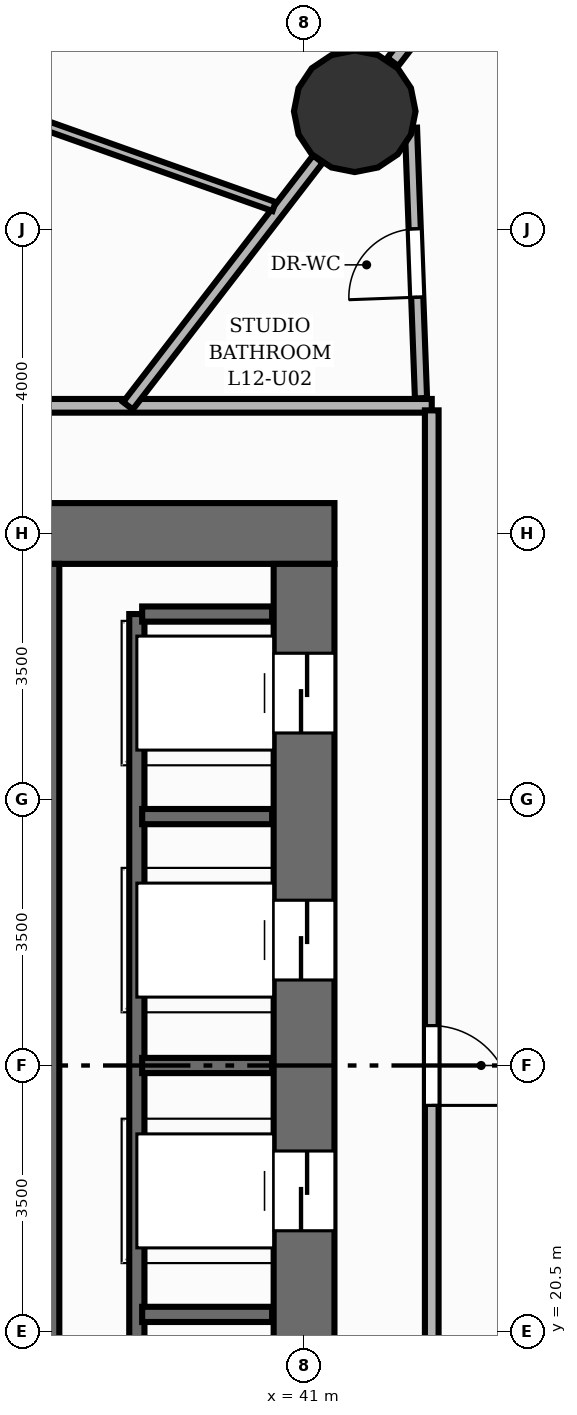
"""IFC4 building model, lengths in metres.
Left out: names, types, materials, properties, quantities, classifications, styles, units other than length and angle.
Written with IfcOpenShell. Run it as: python <this file> out.ifc"""

import sys

from ifc_helpers import new_model, si_unit, direction, frame, frame_2d, origin, origin_2d, place, context, subcontext, project, spatial, rectangle, circle, extrude, element, fill, save


model = new_model("IFC4")
c1 = context("Model", 3, precision=1e-05, world=origin(), true_north=direction((0.0, 1.0)))
c2 = subcontext(c1, "Body", "Model", "MODEL_VIEW")
j1 = project(units=[si_unit("LENGTHUNIT", "METRE"), si_unit("PLANEANGLEUNIT", "RADIAN")], contexts=[c1])
p1 = place(None, origin())
s1 = spatial("IfcSite", under=j1, at=p1, CompositionType="ELEMENT")
p2 = place(p1, origin())
s2 = spatial("IfcBuilding", under=s1, at=p2, CompositionType="ELEMENT")
p3 = place(p2, frame((0.0, 0.0, 44.0)))
s3 = spatial("IfcBuildingStorey", under=s2, at=p3, CompositionType="ELEMENT", Elevation=44.0)
p4 = place(p3, frame((22.6, 31.0, 0.0), z_axis=(0.0, 0.0, 1.0), x_axis=(1.0, 0.0, 0.0)))
e1 = element("IfcWall", 1, at=p4, inside=s3, PredefinedType="SHEAR", context=c2, shape_type="SweptSolid", body=[
    extrude(rectangle(XDim=18.8, YDim=0.8, at=frame_2d((9.4, 0.0))), origin(), (0.0, 0.0, 1.0), 3.2),
])
p5 = place(p4, frame((11.8, 0.0, 0.0)))
e2 = element("IfcOpeningElement", 2, at=p5, cuts=e1, PredefinedType="OPENING", context=c2, shape_type="SweptSolid", body=[
    extrude(rectangle(XDim=1.1, YDim=2.15, at=frame_2d((0.55, 1.075))), frame((0.0, 0.41, 0.0), z_axis=(0.0, -1.0, 0.0), x_axis=(1.0, 0.0, 0.0)), (0.0, 0.0, 1.0), 0.82),
])
p6 = place(p3, frame((41.0, 17.4, 0.0), z_axis=(0.0, 0.0, 1.0), x_axis=(0.0, 1.0, 0.0)))
e3 = element("IfcWall", 3, at=p6, inside=s3, PredefinedType="SHEAR", context=c2, shape_type="SweptSolid", body=[
    extrude(rectangle(XDim=13.2, YDim=0.8, at=frame_2d((6.6, 0.0))), origin(), (0.0, 0.0, 1.0), 3.2),
])
p7 = place(p6, frame((1.175, 0.0, 0.0)))
e4 = element("IfcOpeningElement", 4, at=p7, cuts=e3, PredefinedType="OPENING", context=c2, shape_type="SweptSolid", body=[
    extrude(rectangle(XDim=1.05, YDim=2.15, at=frame_2d((0.525, 1.075))), frame((0.0, 0.41, 0.0), z_axis=(0.0, -1.0, 0.0), x_axis=(1.0, 0.0, 0.0)), (0.0, 0.0, 1.0), 0.82),
])
p8 = place(p6, frame((4.425, 0.0, 0.0)))
e5 = element("IfcOpeningElement", 5, at=p8, cuts=e3, PredefinedType="OPENING", context=c2, shape_type="SweptSolid", body=[
    extrude(rectangle(XDim=1.05, YDim=2.15, at=frame_2d((0.525, 1.075))), frame((0.0, 0.41, 0.0), z_axis=(0.0, -1.0, 0.0), x_axis=(1.0, 0.0, 0.0)), (0.0, 0.0, 1.0), 0.82),
])
p9 = place(p6, frame((7.725, 0.0, 0.0)))
e6 = element("IfcOpeningElement", 6, at=p9, cuts=e3, PredefinedType="OPENING", context=c2, shape_type="SweptSolid", body=[
    extrude(rectangle(XDim=1.05, YDim=2.15, at=frame_2d((0.525, 1.075))), frame((0.0, 0.41, 0.0), z_axis=(0.0, -1.0, 0.0), x_axis=(1.0, 0.0, 0.0)), (0.0, 0.0, 1.0), 0.82),
])
p10 = place(p6, frame((10.975, 0.0, 0.0)))
e7 = element("IfcOpeningElement", 7, at=p10, cuts=e3, PredefinedType="OPENING", context=c2, shape_type="SweptSolid", body=[
    extrude(rectangle(XDim=1.05, YDim=2.15, at=frame_2d((0.525, 1.075))), frame((0.0, 0.41, 0.0), z_axis=(0.0, -1.0, 0.0), x_axis=(1.0, 0.0, 0.0)), (0.0, 0.0, 1.0), 0.82),
])
p11 = place(p3, frame((37.5, 17.4, 0.0), z_axis=(0.0, 0.0, 1.0), x_axis=(0.0, 1.0, 0.0)))
e8 = element("IfcWall", 8, at=p11, inside=s3, PredefinedType="SHEAR", context=c2, shape_type="SweptSolid", body=[
    extrude(rectangle(XDim=13.2, YDim=0.56, at=frame_2d((6.6, 0.0))), origin(), (0.0, 0.0, 1.0), 3.2),
])
p12 = place(p3, frame((41.667, 36.555, 0.0), z_axis=(0.0, 0.0, 1.0), x_axis=(1.0, 0.0, 0.0)))
e9 = element("IfcColumn", 9, at=p12, inside=s3, PredefinedType="COLUMN", context=c2, shape_type="SweptSolid", body=[
    extrude(circle(Radius=0.8, at=origin_2d()), origin(), (0.0, 0.0, 1.0), 3.2),
])
p13 = place(p3, frame((42.122, 39.116, 0.0), z_axis=(0.0, 0.0, 1.0), x_axis=(0.858069400356, -0.513533742001, 0.0)))
e10 = element("IfcWall", 10, at=p13, inside=s3, PredefinedType="SOLIDWALL", context=c2, shape_type="SweptSolid", body=[
    extrude(rectangle(XDim=3.323, YDim=0.25, at=frame_2d((1.661, 0.0))), origin(), (0.0, 0.0, 1.0), 2.96),
])
p14 = place(p3, frame((38.8, 18.06, 0.0), z_axis=(0.0, 0.0, 1.0), x_axis=(0.0, 1.0, 0.0)))
e11 = element("IfcWall", 11, at=p14, inside=s3, PredefinedType="SHEAR", context=c2, shape_type="SweptSolid", body=[
    extrude(rectangle(XDim=11.88, YDim=0.2, at=frame_2d((5.94, 0.0))), origin(), (0.0, 0.0, 1.0), 3.2),
])
for number, where, z_axis, x_axis in (
    (12, (38.87, 29.94, 0.0), (0.0, 0.0, 1.0), (1.0, 0.0, 0.0)),
    (13, (38.87, 20.725, 0.0), (0.0, 0.0, 1.0), (1.0, 0.0, 0.0)),
    (14, (38.87, 24.0, 0.0), (0.0, 0.0, 1.0), (1.0, 0.0, 0.0)),
    (15, (38.87, 27.275, 0.0), (0.0, 0.0, 1.0), (1.0, 0.0, 0.0)),
):
    element("IfcWall", number, at=place(p3, frame(where, z_axis=z_axis, x_axis=x_axis)), inside=s3, PredefinedType="SHEAR", context=c2, shape_type="SweptSolid", body=[
        extrude(rectangle(XDim=1.71, YDim=0.2, at=frame_2d((0.855, 0.0))), origin(), (0.0, 0.0, 1.0), 3.2),
    ])
p15 = place(p3, frame((42.167, 37.205, 0.0), z_axis=(0.0, 0.0, 1.0), x_axis=(0.609965884242, 0.792427674971, 0.0)))
e16 = element("IfcWall", 16, at=p15, inside=s3, PredefinedType="PARTITIONING", context=c2, shape_type="SweptSolid", body=[
    extrude(rectangle(XDim=1.572, YDim=0.18, at=frame_2d((0.786, 0.0))), origin(), (0.0, 0.0, 1.0), 2.178),
])
p16 = place(p3, frame((32.149, 32.68, 0.0), z_axis=(0.0, 0.0, 1.0), x_axis=(1.0, 0.0, 0.0)))
e17 = element("IfcWall", 17, at=p16, inside=s3, PredefinedType="PARTITIONING", context=c2, shape_type="SweptSolid", body=[
    extrude(rectangle(XDim=10.531, YDim=0.18, at=frame_2d((5.266, 0.0))), origin(), (0.0, 0.0, 1.0), 2.955),
])
p17 = place(p3, frame((42.68, 32.62, 0.0), z_axis=(0.0, 0.0, 1.0), x_axis=(0.0, -1.0, 0.0)))
e18 = element("IfcWall", 18, at=p17, inside=s3, PredefinedType="PARTITIONING", context=c2, shape_type="SweptSolid", body=[
    extrude(rectangle(XDim=17.24, YDim=0.18, at=frame_2d((8.62, 0.0))), origin(), (0.0, 0.0, 1.0), 2.955),
])
p18 = place(p17, frame((8.095, 0.0, 0.0)))
e19 = element("IfcOpeningElement", 19, at=p18, cuts=e18, PredefinedType="OPENING", context=c2, shape_type="SweptSolid", body=[
    extrude(rectangle(XDim=1.05, YDim=2.15, at=frame_2d((0.525, 1.075))), frame((0.0, 0.1, 0.0), z_axis=(0.0, -1.0, 0.0), x_axis=(1.0, 0.0, 0.0)), (0.0, 0.0, 1.0), 0.2),
])
p19 = place(p3, frame((42.539, 32.78, 0.0), z_axis=(0.0, 0.0, 1.0), x_axis=(-0.037031951983, 0.999314082024, 0.0)))
e20 = element("IfcWall", 20, at=p19, inside=s3, PredefinedType="PLUMBINGWALL", context=c2, shape_type="SweptSolid", body=[
    extrude(rectangle(XDim=3.56, YDim=0.16, at=frame_2d((1.78, 0.0))), origin(), (0.0, 0.0, 1.0), 2.955),
])
p20 = place(p19, frame((1.33, 0.0, 0.0)))
e21 = element("IfcOpeningElement", 21, at=p20, cuts=e20, PredefinedType="OPENING", context=c2, shape_type="SweptSolid", body=[
    extrude(rectangle(XDim=0.9, YDim=2.1, at=frame_2d((0.45, 1.05))), frame((0.0, 0.09, 0.0), z_axis=(0.0, -1.0, 0.0), x_axis=(1.0, 0.0, 0.0)), (0.0, 0.0, 1.0), 0.18),
])
p21 = place(p3, frame((38.683, 32.68, 0.0), z_axis=(0.0, 0.0, 1.0), x_axis=(0.610116797158, 0.792311487879, 0.0)))
e22 = element("IfcWall", 22, at=p21, inside=s3, PredefinedType="PLUMBINGWALL", context=c2, shape_type="SweptSolid", body=[
    extrude(rectangle(XDim=4.096, YDim=0.16, at=frame_2d((2.048, 0.0))), origin(), (0.0, 0.0, 1.0), 2.178),
])
p22 = place(p3, frame((40.606, 35.302, 0.0), z_axis=(0.0, 0.0, 1.0), x_axis=(-0.942237172067, 0.334946430904, 0.0)))
e23 = element("IfcWall", 23, at=p22, inside=s3, PredefinedType="PARTITIONING", context=c2, shape_type="SweptSolid", body=[
    extrude(rectangle(XDim=8.759, YDim=0.125, at=frame_2d((4.379, 0.0))), origin(), (0.0, 0.0, 1.0), 2.955),
])
p23 = place(p8, origin())
e24 = element("IfcDoor", 24, at=p23, inside=s3, OperationType="DOUBLE_DOOR_SLIDING", PredefinedType="DOOR", context=c2, shape_type="SweptSolid", body=[
    extrude(rectangle(XDim=1.05, YDim=2.15, at=frame_2d((0.525, 1.075))), frame((0.0, 0.025, 0.0), z_axis=(0.0, -1.0, 0.0), x_axis=(1.0, 0.0, 0.0)), (0.0, 0.0, 1.0), 0.05),
])
fill(e5, e24)
p24 = place(p9, origin())
e25 = element("IfcDoor", 25, at=p24, inside=s3, OperationType="DOUBLE_DOOR_SLIDING", PredefinedType="DOOR", context=c2, shape_type="SweptSolid", body=[
    extrude(rectangle(XDim=1.05, YDim=2.15, at=frame_2d((0.525, 1.075))), frame((0.0, 0.025, 0.0), z_axis=(0.0, -1.0, 0.0), x_axis=(1.0, 0.0, 0.0)), (0.0, 0.0, 1.0), 0.05),
])
fill(e6, e25)
p25 = place(p10, origin())
e26 = element("IfcDoor", 26, at=p25, inside=s3, OperationType="DOUBLE_DOOR_SLIDING", PredefinedType="DOOR", context=c2, shape_type="SweptSolid", body=[
    extrude(rectangle(XDim=1.05, YDim=2.15, at=frame_2d((0.525, 1.075))), frame((0.0, 0.025, 0.0), z_axis=(0.0, -1.0, 0.0), x_axis=(1.0, 0.0, 0.0)), (0.0, 0.0, 1.0), 0.05),
])
fill(e7, e26)
p26 = place(p18, origin())
e27 = element("IfcDoor", 27, at=p26, inside=s3, OperationType="SINGLE_SWING_RIGHT", PredefinedType="DOOR", context=c2, shape_type="SweptSolid", body=[
    extrude(rectangle(XDim=1.05, YDim=2.15, at=frame_2d((0.525, 1.075))), frame((0.0, 0.025, 0.0), z_axis=(0.0, -1.0, 0.0), x_axis=(1.0, 0.0, 0.0)), (0.0, 0.0, 1.0), 0.05),
])
fill(e19, e27)
p27 = place(p20, origin())
e28 = element("IfcDoor", 28, at=p27, inside=s3, OperationType="SINGLE_SWING_LEFT", PredefinedType="DOOR", context=c2, shape_type="SweptSolid", body=[
    extrude(rectangle(XDim=0.9, YDim=2.1, at=frame_2d((0.45, 1.05))), frame((0.0, 0.025, 0.0), z_axis=(0.0, -1.0, 0.0), x_axis=(1.0, 0.0, 0.0)), (0.0, 0.0, 1.0), 0.05),
])
fill(e21, e28)
save(model, sys.argv[1])
